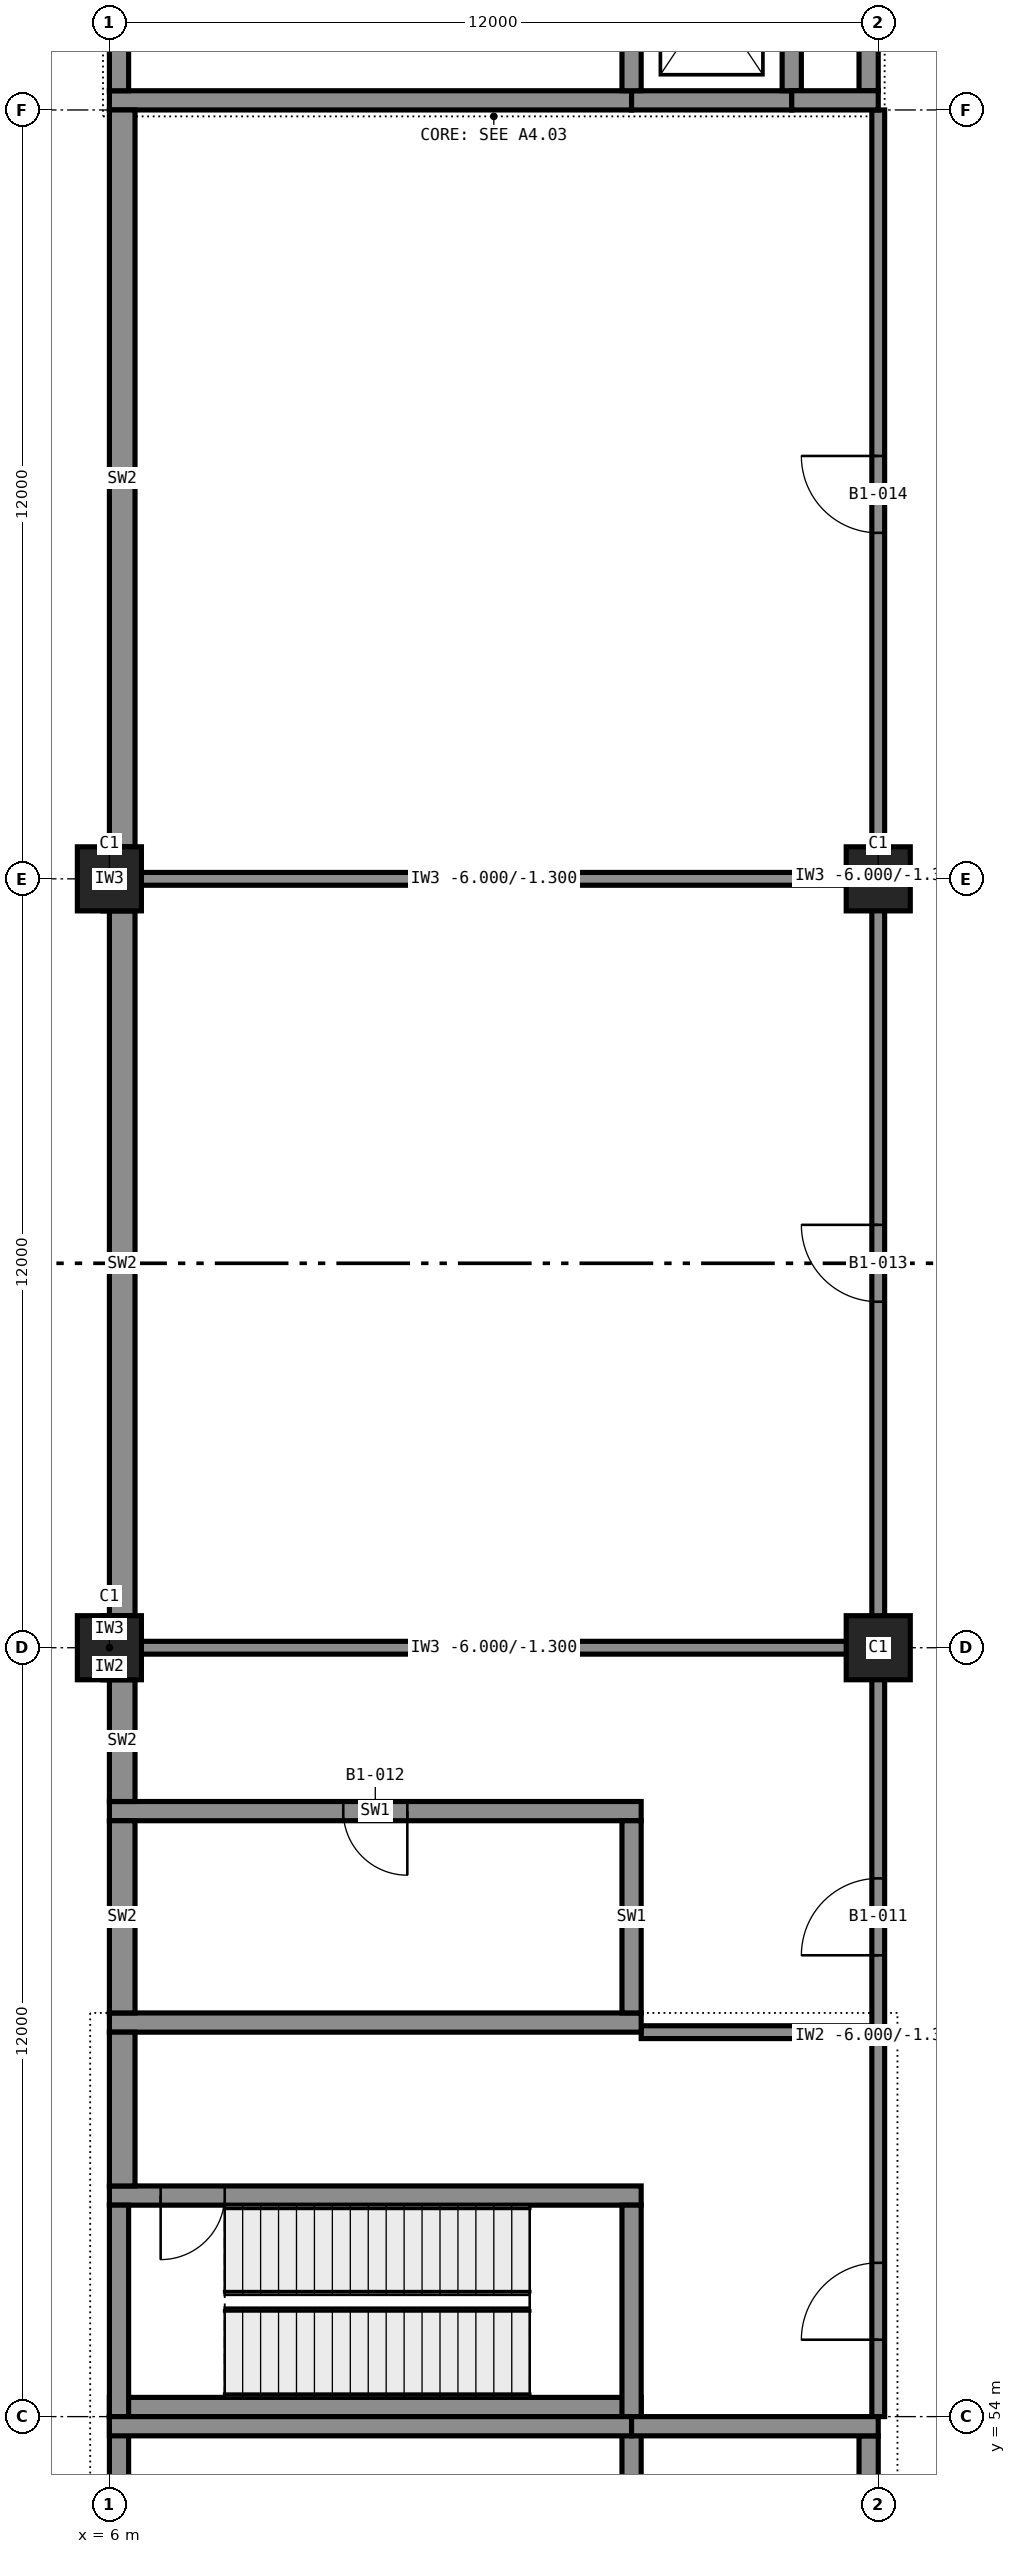
"""IFC4 building model, lengths in metres.
Left out: names, types, materials, properties, quantities, classifications, styles, units other than length and angle.
Written with IfcOpenShell. Run it as: python <this file> out.ifc"""

import sys

from ifc_helpers import new_model, si_unit, direction, frame, frame_2d, origin, origin_2d, place, context, subcontext, project, spatial, rectangle, extrude, element, fill, save


model = new_model("IFC4")
c1 = context("Model", 3, precision=1e-05, world=origin(), true_north=direction((0.0, 1.0)))
c2 = subcontext(c1, "Body", "Model", "MODEL_VIEW")
j1 = project(units=[si_unit("LENGTHUNIT", "METRE"), si_unit("PLANEANGLEUNIT", "RADIAN")], contexts=[c1])
p1 = place(None, origin())
s1 = spatial("IfcSite", under=j1, at=p1, CompositionType="ELEMENT")
p2 = place(p1, origin())
s2 = spatial("IfcBuilding", under=s1, at=p2, CompositionType="ELEMENT")
p3 = place(p2, frame((0.0, 0.0, -6.0)))
s3 = spatial("IfcBuildingStorey", under=s2, at=p3, CompositionType="ELEMENT", Elevation=-6.0)
for number, where, z_axis, x_axis in (
    (1, (6.0, 66.0, -0.4), (0.0, 0.0, 1.0), (1.0, 0.0, 0.0)),
    (2, (6.0, 78.0, -0.4), (0.0, 0.0, 1.0), (1.0, 0.0, 0.0)),
    (3, (18.0, 66.0, -0.4), (0.0, 0.0, 1.0), (1.0, 0.0, 0.0)),
    (4, (18.0, 78.0, -0.4), (0.0, 0.0, 1.0), (1.0, 0.0, 0.0)),
):
    element("IfcColumn", number, at=place(p3, frame(where, z_axis=z_axis, x_axis=x_axis)), inside=s3, PredefinedType="COLUMN", context=c2, shape_type="SweptSolid", body=[
        extrude(rectangle(XDim=1.0, YDim=1.0, at=origin_2d()), origin(), (0.0, 0.0, 1.0), 6.4),
    ])
p4 = place(p3, frame((6.0, 54.15, 0.0), z_axis=(0.0, 0.0, 1.0), x_axis=(1.0, 0.0, 0.0)))
e5 = element("IfcWall", 5, at=p4, inside=s3, PredefinedType="SHEAR", context=c2, shape_type="SweptSolid", body=[
    extrude(rectangle(XDim=8.3, YDim=0.3, at=frame_2d((4.15, 0.0))), origin(), (0.0, 0.0, 1.0), 5.7),
])
p5 = place(p3, frame((6.0, 57.45, 0.0), z_axis=(0.0, 0.0, 1.0), x_axis=(1.0, 0.0, 0.0)))
e6 = element("IfcWall", 6, at=p5, inside=s3, PredefinedType="SHEAR", context=c2, shape_type="SweptSolid", body=[
    extrude(rectangle(XDim=8.3, YDim=0.3, at=frame_2d((4.15, 0.0))), origin(), (0.0, 0.0, 1.0), 5.7),
])
p6 = place(p5, frame((0.8, 0.0, 0.0)))
e7 = element("IfcOpeningElement", 7, at=p6, cuts=e6, PredefinedType="OPENING", context=c2, shape_type="SweptSolid", body=[
    extrude(rectangle(XDim=1.0, YDim=2.1, at=frame_2d((0.5, 1.05))), frame((0.0, 0.16, 0.0), z_axis=(0.0, -1.0, 0.0), x_axis=(1.0, 0.0, 0.0)), (0.0, 0.0, 1.0), 0.32),
])
for number, where, z_axis, x_axis in (
    (8, (6.15, 54.0, 0.0), (0.0, 0.0, 1.0), (0.0, 1.0, 0.0)),
    (9, (14.15, 54.0, 0.0), (0.0, 0.0, 1.0), (0.0, 1.0, 0.0)),
):
    element("IfcWall", number, at=place(p3, frame(where, z_axis=z_axis, x_axis=x_axis)), inside=s3, PredefinedType="SHEAR", context=c2, shape_type="SweptSolid", body=[
        extrude(rectangle(XDim=3.3, YDim=0.3, at=frame_2d((1.65, 0.0))), origin(), (0.0, 0.0, 1.0), 5.7),
    ])
p7 = place(p3, frame((6.0, 60.15, 0.0), z_axis=(0.0, 0.0, 1.0), x_axis=(1.0, 0.0, 0.0)))
e10 = element("IfcWall", 10, at=p7, inside=s3, PredefinedType="SHEAR", context=c2, shape_type="SweptSolid", body=[
    extrude(rectangle(XDim=8.3, YDim=0.3, at=frame_2d((4.15, 0.0))), origin(), (0.0, 0.0, 1.0), 5.7),
])
p8 = place(p3, frame((6.0, 63.45, 0.0), z_axis=(0.0, 0.0, 1.0), x_axis=(1.0, 0.0, 0.0)))
e11 = element("IfcWall", 11, at=p8, inside=s3, PredefinedType="SHEAR", context=c2, shape_type="SweptSolid", body=[
    extrude(rectangle(XDim=8.3, YDim=0.3, at=frame_2d((4.15, 0.0))), origin(), (0.0, 0.0, 1.0), 5.7),
])
p9 = place(p8, frame((3.65, 0.0, 0.0)))
e12 = element("IfcOpeningElement", 12, at=p9, cuts=e11, PredefinedType="OPENING", context=c2, shape_type="SweptSolid", body=[
    extrude(rectangle(XDim=1.0, YDim=2.1, at=frame_2d((0.5, 1.05))), frame((0.0, 0.16, 0.0), z_axis=(0.0, -1.0, 0.0), x_axis=(1.0, 0.0, 0.0)), (0.0, 0.0, 1.0), 0.32),
])
p10 = place(p3, frame((14.15, 60.3, 0.0), z_axis=(0.0, 0.0, 1.0), x_axis=(0.0, 1.0, 0.0)))
e13 = element("IfcWall", 13, at=p10, inside=s3, PredefinedType="SHEAR", context=c2, shape_type="SweptSolid", body=[
    extrude(rectangle(XDim=3.0, YDim=0.3, at=frame_2d((1.5, 0.0))), origin(), (0.0, 0.0, 1.0), 5.7),
])
p11 = place(p3, frame((6.0, 53.85, 0.0), z_axis=(0.0, 0.0, 1.0), x_axis=(1.0, 0.0, 0.0)))
e14 = element("IfcWall", 14, at=p11, inside=s3, PredefinedType="SHEAR", context=c2, shape_type="SweptSolid", body=[
    extrude(rectangle(XDim=8.15, YDim=0.3, at=frame_2d((4.075, 0.0))), origin(), (0.0, 0.0, 1.0), 5.7),
])
p12 = place(p3, frame((14.15, 53.85, 0.0), z_axis=(0.0, 0.0, 1.0), x_axis=(1.0, 0.0, 0.0)))
e15 = element("IfcWall", 15, at=p12, inside=s3, PredefinedType="SHEAR", context=c2, shape_type="SweptSolid", body=[
    extrude(rectangle(XDim=3.85, YDim=0.3, at=frame_2d((1.925, 0.0))), origin(), (0.0, 0.0, 1.0), 5.7),
])
p13 = place(p3, frame((6.15, 50.55, 0.0), z_axis=(0.0, 0.0, 1.0), x_axis=(0.0, 1.0, 0.0)))
e16 = element("IfcWall", 16, at=p13, inside=s3, PredefinedType="SHEAR", context=c2, shape_type="SweptSolid", body=[
    extrude(rectangle(XDim=3.45, YDim=0.3, at=frame_2d((1.725, 0.0))), origin(), (0.0, 0.0, 1.0), 5.7),
])
p14 = place(p3, frame((17.85, 50.55, 0.0), z_axis=(0.0, 0.0, 1.0), x_axis=(0.0, 1.0, 0.0)))
e17 = element("IfcWall", 17, at=p14, inside=s3, PredefinedType="SHEAR", context=c2, shape_type="SweptSolid", body=[
    extrude(rectangle(XDim=3.15, YDim=0.3, at=frame_2d((1.575, 0.0))), origin(), (0.0, 0.0, 1.0), 5.7),
])
p15 = place(p14, frame((1.15, 0.0, 0.0)))
e18 = element("IfcOpeningElement", 18, at=p15, cuts=e17, PredefinedType="OPENING", context=c2, shape_type="SweptSolid", body=[
    extrude(rectangle(XDim=1.0, YDim=2.1, at=frame_2d((0.5, 1.05))), frame((0.0, 0.16, 0.0), z_axis=(0.0, -1.0, 0.0), x_axis=(1.0, 0.0, 0.0)), (0.0, 0.0, 1.0), 0.32),
])
p16 = place(p3, frame((14.15, 50.7, 0.0), z_axis=(0.0, 0.0, 1.0), x_axis=(0.0, 1.0, 0.0)))
e19 = element("IfcWall", 19, at=p16, inside=s3, PredefinedType="SHEAR", context=c2, shape_type="SweptSolid", body=[
    extrude(rectangle(XDim=3.3, YDim=0.3, at=frame_2d((1.65, 0.0))), origin(), (0.0, 0.0, 1.0), 5.7),
])
p17 = place(p3, frame((6.0, 90.15, 0.0), z_axis=(0.0, 0.0, 1.0), x_axis=(1.0, 0.0, 0.0)))
e20 = element("IfcWall", 20, at=p17, inside=s3, PredefinedType="SHEAR", context=c2, shape_type="SweptSolid", body=[
    extrude(rectangle(XDim=8.15, YDim=0.3, at=frame_2d((4.075, 0.0))), origin(), (0.0, 0.0, 1.0), 5.7),
])
p18 = place(p3, frame((14.15, 90.15, 0.0), z_axis=(0.0, 0.0, 1.0), x_axis=(1.0, 0.0, 0.0)))
e21 = element("IfcWall", 21, at=p18, inside=s3, PredefinedType="SHEAR", context=c2, shape_type="SweptSolid", body=[
    extrude(rectangle(XDim=2.5, YDim=0.3, at=frame_2d((1.25, 0.0))), origin(), (0.0, 0.0, 1.0), 5.7),
])
p19 = place(p3, frame((16.65, 90.15, 0.0), z_axis=(0.0, 0.0, 1.0), x_axis=(1.0, 0.0, 0.0)))
e22 = element("IfcWall", 22, at=p19, inside=s3, PredefinedType="SHEAR", context=c2, shape_type="SweptSolid", body=[
    extrude(rectangle(XDim=1.35, YDim=0.3, at=frame_2d((0.675, 0.0))), origin(), (0.0, 0.0, 1.0), 5.7),
])
for number, where, z_axis, x_axis in (
    (23, (6.15, 90.3, 0.0), (0.0, 0.0, 1.0), (0.0, 1.0, 0.0)),
    (24, (17.85, 90.3, 0.0), (0.0, 0.0, 1.0), (0.0, 1.0, 0.0)),
):
    element("IfcWall", number, at=place(p3, frame(where, z_axis=z_axis, x_axis=x_axis)), inside=s3, PredefinedType="SHEAR", context=c2, shape_type="SweptSolid", body=[
        extrude(rectangle(XDim=3.15, YDim=0.3, at=frame_2d((1.575, 0.0))), origin(), (0.0, 0.0, 1.0), 5.7),
    ])
for number, where, z_axis, x_axis in (
    (25, (14.15, 90.3, 0.0), (0.0, 0.0, 1.0), (0.0, 1.0, 0.0)),
    (26, (16.65, 90.3, 0.0), (0.0, 0.0, 1.0), (0.0, 1.0, 0.0)),
):
    element("IfcWall", number, at=place(p3, frame(where, z_axis=z_axis, x_axis=x_axis)), inside=s3, PredefinedType="SHEAR", context=c2, shape_type="SweptSolid", body=[
        extrude(rectangle(XDim=3.0, YDim=0.3, at=frame_2d((1.5, 0.0))), origin(), (0.0, 0.0, 1.0), 5.7),
    ])
p20 = place(p3, frame((6.2, 57.6, 0.0), z_axis=(0.0, 0.0, 1.0), x_axis=(0.0, 1.0, 0.0)))
e27 = element("IfcWall", 27, at=p20, inside=s3, PredefinedType="SOLIDWALL", context=c2, shape_type="SweptSolid", body=[
    extrude(rectangle(XDim=2.4, YDim=0.4, at=frame_2d((1.2, 0.0))), origin(), (0.0, 0.0, 1.0), 5.7),
])
p21 = place(p3, frame((6.2, 60.3, 0.0), z_axis=(0.0, 0.0, 1.0), x_axis=(0.0, 1.0, 0.0)))
e28 = element("IfcWall", 28, at=p21, inside=s3, PredefinedType="SOLIDWALL", context=c2, shape_type="SweptSolid", body=[
    extrude(rectangle(XDim=3.0, YDim=0.4, at=frame_2d((1.5, 0.0))), origin(), (0.0, 0.0, 1.0), 5.7),
])
p22 = place(p3, frame((6.2, 63.6, 0.0), z_axis=(0.0, 0.0, 1.0), x_axis=(0.0, 1.0, 0.0)))
e29 = element("IfcWall", 29, at=p22, inside=s3, PredefinedType="SOLIDWALL", context=c2, shape_type="SweptSolid", body=[
    extrude(rectangle(XDim=1.9, YDim=0.4, at=frame_2d((0.95, 0.0))), origin(), (0.0, 0.0, 1.0), 5.7),
])
p23 = place(p3, frame((6.2, 66.5, 0.0), z_axis=(0.0, 0.0, 1.0), x_axis=(0.0, 1.0, 0.0)))
e30 = element("IfcWall", 30, at=p23, inside=s3, PredefinedType="SOLIDWALL", context=c2, shape_type="SweptSolid", body=[
    extrude(rectangle(XDim=11.0, YDim=0.4, at=frame_2d((5.5, 0.0))), origin(), (0.0, 0.0, 1.0), 5.7),
])
p24 = place(p3, frame((6.2, 78.5, 0.0), z_axis=(0.0, 0.0, 1.0), x_axis=(0.0, 1.0, 0.0)))
e31 = element("IfcWall", 31, at=p24, inside=s3, PredefinedType="SOLIDWALL", context=c2, shape_type="SweptSolid", body=[
    extrude(rectangle(XDim=11.5, YDim=0.4, at=frame_2d((5.75, 0.0))), origin(), (0.0, 0.0, 1.0), 5.7),
])
p25 = place(p3, frame((14.3, 60.0, 0.0), z_axis=(0.0, 0.0, 1.0), x_axis=(1.0, 0.0, 0.0)))
e32 = element("IfcWall", 32, at=p25, inside=s3, PredefinedType="PARTITIONING", context=c2, shape_type="SweptSolid", body=[
    extrude(rectangle(XDim=3.6, YDim=0.2, at=frame_2d((1.8, 0.0))), origin(), (0.0, 0.0, 1.0), 5.7),
])
p26 = place(p3, frame((5.9, 66.0, 0.0), z_axis=(0.0, 0.0, 1.0), x_axis=(1.0, 0.0, 0.0)))
e33 = element("IfcWall", 33, at=p26, inside=s3, PredefinedType="PARTITIONING", context=c2, shape_type="SweptSolid", body=[
    extrude(rectangle(XDim=12.2, YDim=0.2, at=frame_2d((6.1, 0.0))), origin(), (0.0, 0.0, 1.0), 4.7),
])
p27 = place(p3, frame((6.1, 78.0, 0.0), z_axis=(0.0, 0.0, 1.0), x_axis=(1.0, 0.0, 0.0)))
e34 = element("IfcWall", 34, at=p27, inside=s3, PredefinedType="PARTITIONING", context=c2, shape_type="SweptSolid", body=[
    extrude(rectangle(XDim=11.8, YDim=0.2, at=frame_2d((5.9, 0.0))), origin(), (0.0, 0.0, 1.0), 4.7),
])
for number, where, z_axis, x_axis in (
    (35, (6.0, 65.5, 0.0), (0.0, 0.0, 1.0), (0.0, 1.0, 0.0)),
    (36, (6.0, 66.1, 0.0), (0.0, 0.0, 1.0), (0.0, 1.0, 0.0)),
):
    element("IfcWall", number, at=place(p3, frame(where, z_axis=z_axis, x_axis=x_axis)), inside=s3, PredefinedType="PARTITIONING", context=c2, shape_type="SweptSolid", body=[
        extrude(rectangle(XDim=0.4, YDim=0.2, at=frame_2d((0.2, 0.0))), origin(), (0.0, 0.0, 1.0), 5.7),
    ])
p28 = place(p3, frame((6.0, 77.5, 0.0), z_axis=(0.0, 0.0, 1.0), x_axis=(0.0, 1.0, 0.0)))
e37 = element("IfcWall", 37, at=p28, inside=s3, PredefinedType="PARTITIONING", context=c2, shape_type="SweptSolid", body=[
    extrude(rectangle(XDim=1.0, YDim=0.2, at=frame_2d((0.5, 0.0))), origin(), (0.0, 0.0, 1.0), 5.7),
])
p29 = place(p3, frame((18.0, 54.0, 0.0), z_axis=(0.0, 0.0, 1.0), x_axis=(0.0, 1.0, 0.0)))
e38 = element("IfcWall", 38, at=p29, inside=s3, PredefinedType="PARTITIONING", context=c2, shape_type="SweptSolid", body=[
    extrude(rectangle(XDim=11.9, YDim=0.2, at=frame_2d((5.95, 0.0))), origin(), (0.0, 0.0, 1.0), 4.7),
])
p30 = place(p29, frame((1.2, 0.0, 0.0)))
e39 = element("IfcOpeningElement", 39, at=p30, cuts=e38, PredefinedType="OPENING", context=c2, shape_type="SweptSolid", body=[
    extrude(rectangle(XDim=1.2, YDim=2.1, at=frame_2d((0.6, 1.05))), frame((0.0, 0.11, 0.0), z_axis=(0.0, -1.0, 0.0), x_axis=(1.0, 0.0, 0.0)), (0.0, 0.0, 1.0), 0.22),
])
p31 = place(p29, frame((7.2, 0.0, 0.0)))
e40 = element("IfcOpeningElement", 40, at=p31, cuts=e38, PredefinedType="OPENING", context=c2, shape_type="SweptSolid", body=[
    extrude(rectangle(XDim=1.2, YDim=2.1, at=frame_2d((0.6, 1.05))), frame((0.0, 0.11, 0.0), z_axis=(0.0, -1.0, 0.0), x_axis=(1.0, 0.0, 0.0)), (0.0, 0.0, 1.0), 0.22),
])
p32 = place(p3, frame((18.0, 66.1, 0.0), z_axis=(0.0, 0.0, 1.0), x_axis=(0.0, 1.0, 0.0)))
e41 = element("IfcWall", 41, at=p32, inside=s3, PredefinedType="PARTITIONING", context=c2, shape_type="SweptSolid", body=[
    extrude(rectangle(XDim=23.9, YDim=0.2, at=frame_2d((11.95, 0.0))), origin(), (0.0, 0.0, 1.0), 4.7),
])
p33 = place(p32, frame((5.3, 0.0, 0.0)))
e42 = element("IfcOpeningElement", 42, at=p33, cuts=e41, PredefinedType="OPENING", context=c2, shape_type="SweptSolid", body=[
    extrude(rectangle(XDim=1.2, YDim=2.1, at=frame_2d((0.6, 1.05))), frame((0.0, 0.11, 0.0), z_axis=(0.0, -1.0, 0.0), x_axis=(1.0, 0.0, 0.0)), (0.0, 0.0, 1.0), 0.22),
])
p34 = place(p32, frame((17.3, 0.0, 0.0)))
e43 = element("IfcOpeningElement", 43, at=p34, cuts=e41, PredefinedType="OPENING", context=c2, shape_type="SweptSolid", body=[
    extrude(rectangle(XDim=1.2, YDim=2.1, at=frame_2d((0.6, 1.05))), frame((0.0, 0.11, 0.0), z_axis=(0.0, -1.0, 0.0), x_axis=(1.0, 0.0, 0.0)), (0.0, 0.0, 1.0), 0.22),
])
p35 = place(p30, origin())
e44 = element("IfcDoor", 44, at=p35, inside=s3, OperationType="SINGLE_SWING_RIGHT", PredefinedType="DOOR", context=c2, shape_type="SweptSolid", body=[
    extrude(rectangle(XDim=1.2, YDim=2.1, at=frame_2d((0.6, 1.05))), frame((0.0, 0.025, 0.0), z_axis=(0.0, -1.0, 0.0), x_axis=(1.0, 0.0, 0.0)), (0.0, 0.0, 1.0), 0.05),
])
fill(e39, e44)
p36 = place(p6, frame((1.0, 0.0, 0.0), z_axis=(0.0, 0.0, 1.0), x_axis=(-1.0, 0.0, 0.0)))
e45 = element("IfcDoor", 45, at=p36, inside=s3, OperationType="SINGLE_SWING_LEFT", PredefinedType="DOOR", context=c2, shape_type="SweptSolid", body=[
    extrude(rectangle(XDim=1.0, YDim=2.1, at=frame_2d((0.5, 1.05))), frame((0.0, 0.025, 0.0), z_axis=(0.0, -1.0, 0.0), x_axis=(1.0, 0.0, 0.0)), (0.0, 0.0, 1.0), 0.05),
])
fill(e7, e45)
p37 = place(p31, origin())
e46 = element("IfcDoor", 46, at=p37, inside=s3, OperationType="SINGLE_SWING_RIGHT", PredefinedType="DOOR", context=c2, shape_type="SweptSolid", body=[
    extrude(rectangle(XDim=1.2, YDim=2.1, at=frame_2d((0.6, 1.05))), frame((0.0, 0.025, 0.0), z_axis=(0.0, -1.0, 0.0), x_axis=(1.0, 0.0, 0.0)), (0.0, 0.0, 1.0), 0.05),
])
fill(e40, e46)
p38 = place(p9, frame((1.0, 0.0, 0.0), z_axis=(0.0, 0.0, 1.0), x_axis=(-1.0, 0.0, 0.0)))
e47 = element("IfcDoor", 47, at=p38, inside=s3, OperationType="SINGLE_SWING_RIGHT", PredefinedType="DOOR", context=c2, shape_type="SweptSolid", body=[
    extrude(rectangle(XDim=1.0, YDim=2.1, at=frame_2d((0.5, 1.05))), frame((0.0, 0.025, 0.0), z_axis=(0.0, -1.0, 0.0), x_axis=(1.0, 0.0, 0.0)), (0.0, 0.0, 1.0), 0.05),
])
fill(e12, e47)
p39 = place(p33, origin())
e48 = element("IfcDoor", 48, at=p39, inside=s3, OperationType="SINGLE_SWING_LEFT", PredefinedType="DOOR", context=c2, shape_type="SweptSolid", body=[
    extrude(rectangle(XDim=1.2, YDim=2.1, at=frame_2d((0.6, 1.05))), frame((0.0, 0.025, 0.0), z_axis=(0.0, -1.0, 0.0), x_axis=(1.0, 0.0, 0.0)), (0.0, 0.0, 1.0), 0.05),
])
fill(e42, e48)
p40 = place(p34, origin())
e49 = element("IfcDoor", 49, at=p40, inside=s3, OperationType="SINGLE_SWING_LEFT", PredefinedType="DOOR", context=c2, shape_type="SweptSolid", body=[
    extrude(rectangle(XDim=1.2, YDim=2.1, at=frame_2d((0.6, 1.05))), frame((0.0, 0.025, 0.0), z_axis=(0.0, -1.0, 0.0), x_axis=(1.0, 0.0, 0.0)), (0.0, 0.0, 1.0), 0.05),
])
fill(e43, e49)
save(model, sys.argv[1])
